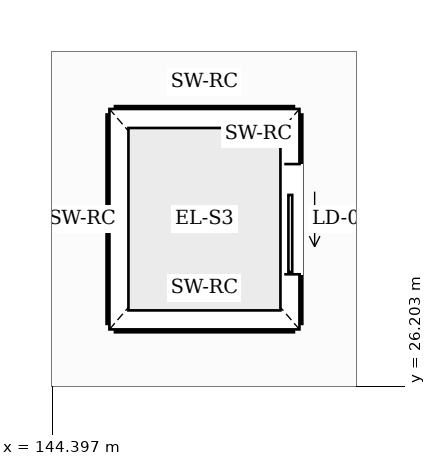
"""IFC4 building model, lengths in metres.
Left out: names, types, materials, properties, quantities, classifications, styles, units other than length and angle.
Written with IfcOpenShell. Run it as: python <this file> out.ifc"""

import sys

from ifc_helpers import new_model, si_unit, direction, frame, frame_2d, origin, place, context, subcontext, project, spatial, rectangle, extrude, element, fill, save


model = new_model("IFC4")
c1 = context("Model", 3, precision=1e-05, world=origin(), true_north=direction((0.0, 1.0)))
c2 = subcontext(c1, "Body", "Model", "MODEL_VIEW")
j1 = project(units=[si_unit("LENGTHUNIT", "METRE"), si_unit("PLANEANGLEUNIT", "RADIAN")], contexts=[c1])
p1 = place(None, origin())
s1 = spatial("IfcSite", under=j1, at=p1, CompositionType="ELEMENT")
p2 = place(p1, origin())
s2 = spatial("IfcBuilding", under=s1, at=p2, CompositionType="ELEMENT")
p3 = place(p2, frame((0.0, 0.0, 10.2)))
s3 = spatial("IfcBuildingStorey", under=s2, at=p3, CompositionType="ELEMENT", Elevation=10.2)
for number, where, z_axis, x_axis in (
    (1, (145.24, 29.76, 0.0), (0.0, 0.0, 1.0), (1.0, 0.0, 0.0)),
    (2, (145.24, 27.04, 0.0), (0.0, 0.0, 1.0), (1.0, 0.0, 0.0)),
):
    element("IfcWall", number, at=place(p3, frame(where, z_axis=z_axis, x_axis=x_axis)), inside=s3, PredefinedType="SHEAR", context=c2, shape_type="SweptSolid", body=[
        extrude(rectangle(XDim=2.32, YDim=0.22, at=frame_2d((1.16, 0.0))), origin(), (0.0, 0.0, 1.0), 4.56),
    ])
p4 = place(p3, frame((147.56, 27.04, 0.0), z_axis=(0.0, 0.0, 1.0), x_axis=(0.0, 1.0, 0.0)))
e3 = element("IfcWall", 3, at=p4, inside=s3, PredefinedType="SHEAR", context=c2, shape_type="SweptSolid", body=[
    extrude(rectangle(XDim=2.72, YDim=0.22, at=frame_2d((1.36, 0.0))), origin(), (0.0, 0.0, 1.0), 4.56),
])
p5 = place(p4, frame((0.635, 0.0, 0.0)))
e4 = element("IfcOpeningElement", 4, at=p5, cuts=e3, PredefinedType="OPENING", context=c2, shape_type="SweptSolid", body=[
    extrude(rectangle(XDim=1.45, YDim=2.35, at=frame_2d((0.725, 1.175))), frame((0.0, 0.12, 0.0), z_axis=(0.0, -1.0, 0.0), x_axis=(1.0, 0.0, 0.0)), (0.0, 0.0, 1.0), 0.24),
])
p6 = place(p3, frame((145.24, 27.04, 0.0), z_axis=(0.0, 0.0, 1.0), x_axis=(0.0, 1.0, 0.0)))
e5 = element("IfcWall", 5, at=p6, inside=s3, PredefinedType="SHEAR", context=c2, shape_type="SweptSolid", body=[
    extrude(rectangle(XDim=2.72, YDim=0.22, at=frame_2d((1.36, 0.0))), origin(), (0.0, 0.0, 1.0), 4.56),
])
p7 = place(p5, origin())
e6 = element("IfcDoor", 6, at=p7, inside=s3, OperationType="SLIDING_TO_LEFT", PredefinedType="DOOR", context=c2, shape_type="SweptSolid", body=[
    extrude(rectangle(XDim=1.45, YDim=2.35, at=frame_2d((0.725, 1.175))), frame((0.0, 0.025, 0.0), z_axis=(0.0, -1.0, 0.0), x_axis=(1.0, 0.0, 0.0)), (0.0, 0.0, 1.0), 0.05),
])
fill(e4, e6)
save(model, sys.argv[1])
